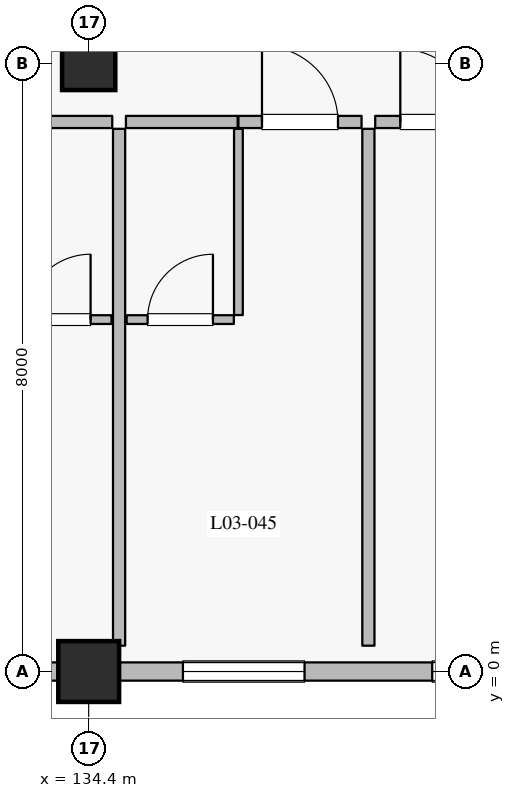
"""IFC4 building model, lengths in metres.
Left out: names, types, materials, properties, quantities, classifications, styles, units other than length and angle.
Written with IfcOpenShell. Run it as: python <this file> out.ifc"""

import sys

from ifc_helpers import new_model, si_unit, direction, frame, frame_2d, origin, origin_2d, place, context, subcontext, project, spatial, rectangle, extrude, element, fill, save


model = new_model("IFC4")
c1 = context("Model", 3, precision=1e-05, world=origin(), true_north=direction((0.0, 1.0)))
c2 = subcontext(c1, "Body", "Model", "MODEL_VIEW")
j1 = project(units=[si_unit("LENGTHUNIT", "METRE"), si_unit("PLANEANGLEUNIT", "RADIAN")], contexts=[c1])
p1 = place(None, origin())
s1 = spatial("IfcSite", under=j1, at=p1, CompositionType="ELEMENT")
p2 = place(p1, origin())
s2 = spatial("IfcBuilding", under=s1, at=p2, CompositionType="ELEMENT")
p3 = place(p2, frame((0.0, 0.0, 16.2)))
s3 = spatial("IfcBuildingStorey", under=s2, at=p3, CompositionType="ELEMENT", Elevation=16.2)
p4 = place(p3, frame((134.4, 0.0, 0.0), z_axis=(0.0, 0.0, 1.0), x_axis=(1.0, 0.0, 0.0)))
e1 = element("IfcColumn", 1, at=p4, inside=s3, PredefinedType="COLUMN", context=c2, shape_type="SweptSolid", body=[
    extrude(rectangle(XDim=0.8, YDim=0.8, at=origin_2d()), origin(), (0.0, 0.0, 1.0), 4.8),
])
p5 = place(p3, frame((134.4, 8.0, 0.0), z_axis=(0.0, 0.0, 1.0), x_axis=(1.0, 0.0, 0.0)))
e2 = element("IfcColumn", 2, at=p5, inside=s3, PredefinedType="COLUMN", context=c2, shape_type="SweptSolid", body=[
    extrude(rectangle(XDim=0.7, YDim=0.7, at=origin_2d()), origin(), (0.0, 0.0, 1.0), 4.8),
])
p6 = place(p3, frame((134.0, 0.0, 0.0), z_axis=(0.0, 0.0, 1.0), x_axis=(-1.0, 0.0, 0.0)))
e3 = element("IfcWall", 3, at=p6, inside=s3, PredefinedType="SOLIDWALL", context=c2, shape_type="SweptSolid", body=[
    extrude(rectangle(XDim=7.6, YDim=0.24, at=frame_2d((3.8, 0.0))), origin(), (0.0, 0.0, 1.0), 4.13),
])
p7 = place(p6, frame((0.39, 0.0, 0.8)))
e4 = element("IfcOpeningElement", 4, at=p7, cuts=e3, PredefinedType="OPENING", context=c2, shape_type="SweptSolid", body=[
    extrude(rectangle(XDim=1.6, YDim=1.6, at=frame_2d((0.8, 0.8))), frame((0.0, 0.13, 0.0), z_axis=(0.0, -1.0, 0.0), x_axis=(1.0, 0.0, 0.0)), (0.0, 0.0, 1.0), 0.26),
])
p8 = place(p6, frame((3.32, 0.0, 0.8)))
e5 = element("IfcOpeningElement", 5, at=p8, cuts=e3, PredefinedType="OPENING", context=c2, shape_type="SweptSolid", body=[
    extrude(rectangle(XDim=1.6, YDim=1.6, at=frame_2d((0.8, 0.8))), frame((0.0, 0.13, 0.0), z_axis=(0.0, -1.0, 0.0), x_axis=(1.0, 0.0, 0.0)), (0.0, 0.0, 1.0), 0.26),
])
p9 = place(p6, frame((6.03, 0.0, 0.8)))
e6 = element("IfcOpeningElement", 6, at=p9, cuts=e3, PredefinedType="OPENING", context=c2, shape_type="SweptSolid", body=[
    extrude(rectangle(XDim=1.4, YDim=1.6, at=frame_2d((0.7, 0.8))), frame((0.0, 0.13, 0.0), z_axis=(0.0, -1.0, 0.0), x_axis=(1.0, 0.0, 0.0)), (0.0, 0.0, 1.0), 0.26),
])
p10 = place(p3, frame((142.4, 0.0, 0.0), z_axis=(0.0, 0.0, 1.0), x_axis=(-1.0, 0.0, 0.0)))
e7 = element("IfcWall", 7, at=p10, inside=s3, PredefinedType="SOLIDWALL", context=c2, shape_type="SweptSolid", body=[
    extrude(rectangle(XDim=7.6, YDim=0.24, at=frame_2d((3.8, 0.0))), origin(), (0.0, 0.0, 1.0), 4.13),
])
p11 = place(p10, frame((1.88, 0.0, 0.8)))
e8 = element("IfcOpeningElement", 8, at=p11, cuts=e7, PredefinedType="OPENING", context=c2, shape_type="SweptSolid", body=[
    extrude(rectangle(XDim=1.6, YDim=1.6, at=frame_2d((0.8, 0.8))), frame((0.0, 0.13, 0.0), z_axis=(0.0, -1.0, 0.0), x_axis=(1.0, 0.0, 0.0)), (0.0, 0.0, 1.0), 0.26),
])
p12 = place(p10, frame((5.16, 0.0, 0.8)))
e9 = element("IfcOpeningElement", 9, at=p12, cuts=e7, PredefinedType="OPENING", context=c2, shape_type="SweptSolid", body=[
    extrude(rectangle(XDim=1.6, YDim=1.6, at=frame_2d((0.8, 0.8))), frame((0.0, 0.13, 0.0), z_axis=(0.0, -1.0, 0.0), x_axis=(1.0, 0.0, 0.0)), (0.0, 0.0, 1.0), 0.26),
])
p13 = place(p3, frame((133.24, 7.23, 0.0), z_axis=(0.0, 0.0, 1.0), x_axis=(1.0, 0.0, 0.0)))
e10 = element("IfcWall", 10, at=p13, inside=s3, PredefinedType="PARTITIONING", context=c2, shape_type="SweptSolid", body=[
    extrude(rectangle(XDim=1.47, YDim=0.16, at=frame_2d((0.735, 0.0))), origin(), (0.0, 0.0, 1.0), 4.535),
])
p14 = place(p3, frame((133.29, 4.63, 0.0), z_axis=(0.0, 0.0, 1.0), x_axis=(1.0, 0.0, 0.0)))
e11 = element("IfcWall", 11, at=p14, inside=s3, PredefinedType="PARTITIONING", context=c2, shape_type="SweptSolid", body=[
    extrude(rectangle(XDim=1.41, YDim=0.115, at=frame_2d((0.705, 0.0))), origin(), (0.0, 0.0, 1.0), 4.535),
])
p15 = place(p14, frame((0.275, 0.0, 0.0)))
e12 = element("IfcOpeningElement", 12, at=p15, cuts=e11, PredefinedType="OPENING", context=c2, shape_type="SweptSolid", body=[
    extrude(rectangle(XDim=0.86, YDim=2.12, at=frame_2d((0.43, 1.06))), frame((0.0, 0.067, 0.0), z_axis=(0.0, -1.0, 0.0), x_axis=(1.0, 0.0, 0.0)), (0.0, 0.0, 1.0), 0.135),
])
p16 = place(p3, frame((134.89, 7.23, 0.0), z_axis=(0.0, 0.0, 1.0), x_axis=(1.0, 0.0, 0.0)))
e13 = element("IfcWall", 13, at=p16, inside=s3, PredefinedType="PARTITIONING", context=c2, shape_type="SweptSolid", body=[
    extrude(rectangle(XDim=1.47, YDim=0.16, at=frame_2d((0.735, 0.0))), origin(), (0.0, 0.0, 1.0), 4.535),
])
p17 = place(p3, frame((136.37, 7.23, 0.0), z_axis=(0.0, 0.0, 1.0), x_axis=(1.0, 0.0, 0.0)))
e14 = element("IfcWall", 14, at=p17, inside=s3, PredefinedType="PARTITIONING", context=c2, shape_type="SweptSolid", body=[
    extrude(rectangle(XDim=1.62, YDim=0.16, at=frame_2d((0.81, 0.0))), origin(), (0.0, 0.0, 1.0), 4.535),
])
p18 = place(p17, frame((0.31, 0.0, 0.0)))
e15 = element("IfcOpeningElement", 15, at=p18, cuts=e14, PredefinedType="OPENING", context=c2, shape_type="SweptSolid", body=[
    extrude(rectangle(XDim=1.0, YDim=2.25, at=frame_2d((0.5, 1.125))), frame((0.0, 0.09, 0.0), z_axis=(0.0, -1.0, 0.0), x_axis=(1.0, 0.0, 0.0)), (0.0, 0.0, 1.0), 0.18),
])
p19 = place(p3, frame((136.37, 4.69, 0.0), z_axis=(0.0, 0.0, 1.0), x_axis=(0.0, 1.0, 0.0)))
e16 = element("IfcWall", 16, at=p19, inside=s3, PredefinedType="PARTITIONING", context=c2, shape_type="SweptSolid", body=[
    extrude(rectangle(XDim=2.45, YDim=0.115, at=frame_2d((1.225, 0.0))), origin(), (0.0, 0.0, 1.0), 4.535),
])
p20 = place(p3, frame((134.9, 4.63, 0.0), z_axis=(0.0, 0.0, 1.0), x_axis=(1.0, 0.0, 0.0)))
e17 = element("IfcWall", 17, at=p20, inside=s3, PredefinedType="PARTITIONING", context=c2, shape_type="SweptSolid", body=[
    extrude(rectangle(XDim=1.41, YDim=0.115, at=frame_2d((0.705, 0.0))), origin(), (0.0, 0.0, 1.0), 4.535),
])
p21 = place(p20, frame((0.275, 0.0, 0.0)))
e18 = element("IfcOpeningElement", 18, at=p21, cuts=e17, PredefinedType="OPENING", context=c2, shape_type="SweptSolid", body=[
    extrude(rectangle(XDim=0.86, YDim=2.12, at=frame_2d((0.43, 1.06))), frame((0.0, 0.067, 0.0), z_axis=(0.0, -1.0, 0.0), x_axis=(1.0, 0.0, 0.0)), (0.0, 0.0, 1.0), 0.135),
])
p22 = place(p3, frame((134.8, 0.34, 0.0), z_axis=(0.0, 0.0, 1.0), x_axis=(0.0, 1.0, 0.0)))
e19 = element("IfcWall", 19, at=p22, inside=s3, PredefinedType="PARTITIONING", context=c2, shape_type="SweptSolid", body=[
    extrude(rectangle(XDim=6.8, YDim=0.16, at=frame_2d((3.4, 0.0))), origin(), (0.0, 0.0, 1.0), 4.535),
])
p23 = place(p3, frame((138.17, 7.23, 0.0), z_axis=(0.0, 0.0, 1.0), x_axis=(1.0, 0.0, 0.0)))
e20 = element("IfcWall", 20, at=p23, inside=s3, PredefinedType="PARTITIONING", context=c2, shape_type="SweptSolid", body=[
    extrude(rectangle(XDim=1.62, YDim=0.16, at=frame_2d((0.81, 0.0))), origin(), (0.0, 0.0, 1.0), 4.535),
])
p24 = place(p23, frame((0.33, 0.0, 0.0)))
e21 = element("IfcOpeningElement", 21, at=p24, cuts=e20, PredefinedType="OPENING", context=c2, shape_type="SweptSolid", body=[
    extrude(rectangle(XDim=0.96, YDim=2.2, at=frame_2d((0.48, 1.1))), frame((0.0, 0.09, 0.0), z_axis=(0.0, -1.0, 0.0), x_axis=(1.0, 0.0, 0.0)), (0.0, 0.0, 1.0), 0.18),
])
p25 = place(p3, frame((138.08, 0.34, 0.0), z_axis=(0.0, 0.0, 1.0), x_axis=(0.0, 1.0, 0.0)))
e22 = element("IfcWall", 22, at=p25, inside=s3, PredefinedType="PARTITIONING", context=c2, shape_type="SweptSolid", body=[
    extrude(rectangle(XDim=6.8, YDim=0.16, at=frame_2d((3.4, 0.0))), origin(), (0.0, 0.0, 1.0), 4.535),
])
p26 = place(p11, origin())
e23 = element("IfcWindow", 23, at=p26, inside=s3, PartitioningType="SINGLE_PANEL", PredefinedType="WINDOW", context=c2, shape_type="SweptSolid", body=[
    extrude(rectangle(XDim=1.6, YDim=1.6, at=frame_2d((0.8, 0.8))), frame((0.0, 0.03, 0.0), z_axis=(0.0, -1.0, 0.0), x_axis=(1.0, 0.0, 0.0)), (0.0, 0.0, 1.0), 0.06),
])
fill(e8, e23)
p27 = place(p12, origin())
e24 = element("IfcWindow", 24, at=p27, inside=s3, PartitioningType="SINGLE_PANEL", PredefinedType="WINDOW", context=c2, shape_type="SweptSolid", body=[
    extrude(rectangle(XDim=1.6, YDim=1.6, at=frame_2d((0.8, 0.8))), frame((0.0, 0.03, 0.0), z_axis=(0.0, -1.0, 0.0), x_axis=(1.0, 0.0, 0.0)), (0.0, 0.0, 1.0), 0.06),
])
fill(e9, e24)
p28 = place(p15, origin())
e25 = element("IfcDoor", 25, at=p28, inside=s3, OperationType="SINGLE_SWING_RIGHT", PredefinedType="DOOR", context=c2, shape_type="SweptSolid", body=[
    extrude(rectangle(XDim=0.86, YDim=2.12, at=frame_2d((0.43, 1.06))), frame((0.0, 0.025, 0.0), z_axis=(0.0, -1.0, 0.0), x_axis=(1.0, 0.0, 0.0)), (0.0, 0.0, 1.0), 0.05),
])
fill(e12, e25)
p29 = place(p18, origin())
e26 = element("IfcDoor", 26, at=p29, inside=s3, OperationType="SINGLE_SWING_LEFT", PredefinedType="DOOR", context=c2, shape_type="SweptSolid", body=[
    extrude(rectangle(XDim=1.0, YDim=2.25, at=frame_2d((0.5, 1.125))), frame((0.0, 0.025, 0.0), z_axis=(0.0, -1.0, 0.0), x_axis=(1.0, 0.0, 0.0)), (0.0, 0.0, 1.0), 0.05),
])
fill(e15, e26)
p30 = place(p21, origin())
e27 = element("IfcDoor", 27, at=p30, inside=s3, OperationType="SINGLE_SWING_RIGHT", PredefinedType="DOOR", context=c2, shape_type="SweptSolid", body=[
    extrude(rectangle(XDim=0.86, YDim=2.12, at=frame_2d((0.43, 1.06))), frame((0.0, 0.025, 0.0), z_axis=(0.0, -1.0, 0.0), x_axis=(1.0, 0.0, 0.0)), (0.0, 0.0, 1.0), 0.05),
])
fill(e18, e27)
p31 = place(p24, origin())
e28 = element("IfcDoor", 28, at=p31, inside=s3, OperationType="SINGLE_SWING_LEFT", PredefinedType="DOOR", context=c2, shape_type="SweptSolid", body=[
    extrude(rectangle(XDim=0.96, YDim=2.2, at=frame_2d((0.48, 1.1))), frame((0.0, 0.025, 0.0), z_axis=(0.0, -1.0, 0.0), x_axis=(1.0, 0.0, 0.0)), (0.0, 0.0, 1.0), 0.05),
])
fill(e21, e28)
save(model, sys.argv[1])
